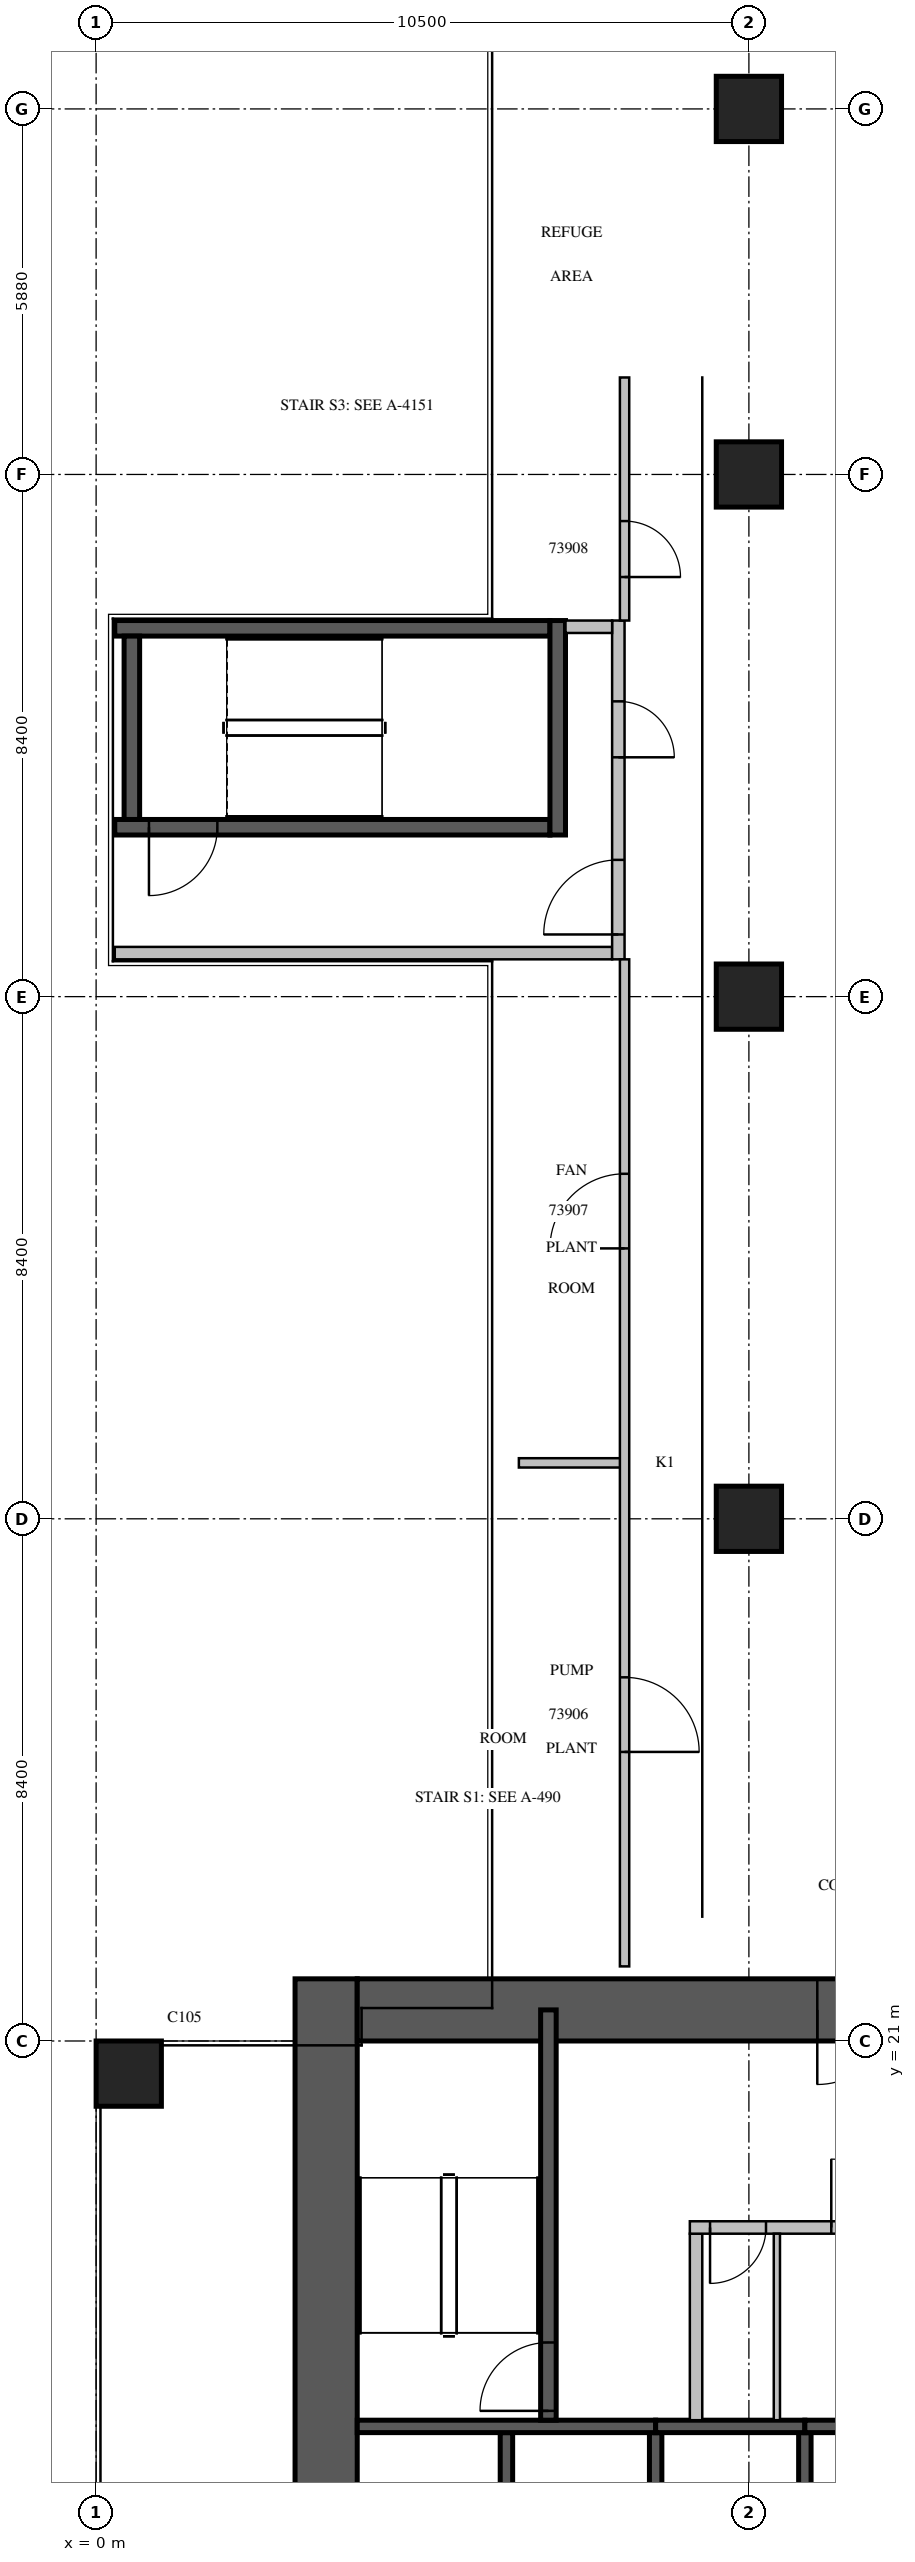
"""IFC4 building model, lengths in metres.
Left out: names, types, materials, properties, quantities, classifications, styles, units other than length and angle.
Written with IfcOpenShell. Run it as: python <this file> out.ifc"""

import sys

from ifc_helpers import new_model, si_unit, direction, frame, frame_2d, origin, origin_2d, place, context, subcontext, project, spatial, rectangle, extrude, source, transform, mapped, element, fill, save


model = new_model("IFC4")
c1 = context("Model", 3, precision=1e-05, world=origin(), true_north=direction((0.0, 1.0)))
c2 = subcontext(c1, "Body", "Model", "MODEL_VIEW")
j1 = project(units=[si_unit("LENGTHUNIT", "METRE"), si_unit("PLANEANGLEUNIT", "RADIAN")], contexts=[c1])
p1 = place(None, origin())
s1 = spatial("IfcSite", under=j1, at=p1, CompositionType="ELEMENT")
p2 = place(p1, origin())
s2 = spatial("IfcBuilding", under=s1, at=p2, CompositionType="ELEMENT")
p3 = place(p2, frame((0.0, 0.0, 162.3)))
s3 = spatial("IfcBuildingStorey", under=s2, at=p3, CompositionType="ELEMENT", Elevation=162.3)
m1 = source(origin(), c2, "Body", "SweptSolid", [
    extrude(rectangle(XDim=1.05, YDim=1.05, at=origin_2d()), origin(), (0.0, 0.0, 1.0), 8.0),
])
for number, where, z_axis, x_axis in (
    (1, (0.525, 20.475, 0.0), (0.0, 0.0, 1.0), (1.0, 0.0, 0.0)),
    (2, (10.5, 29.4, 0.0), (0.0, 0.0, 1.0), (1.0, 0.0, 0.0)),
    (3, (10.5, 37.8, 0.0), (0.0, 0.0, 1.0), (1.0, 0.0, 0.0)),
    (4, (10.5, 46.2, 0.0), (0.0, 0.0, 1.0), (1.0, 0.0, 0.0)),
    (5, (10.5, 52.08, 0.0), (0.0, 0.0, 1.0), (1.0, 0.0, 0.0)),
):
    element("IfcColumn", number, at=place(p3, frame(where, z_axis=z_axis, x_axis=x_axis)), inside=s3, PredefinedType="COLUMN", context=c2, shape_type="MappedRepresentation", body=[
        mapped(m1, transform((0.0, 0.0, 0.0), scale=1.0)),
    ])
p4 = place(p3, frame((3.7, 4.2, 0.0), z_axis=(0.0, 0.0, 1.0), x_axis=(0.0, 1.0, 0.0)))
e6 = element("IfcWall", 6, at=p4, inside=s3, PredefinedType="SHEAR", context=c2, shape_type="SweptSolid", body=[
    extrude(rectangle(XDim=17.8, YDim=1.0, at=frame_2d((8.9, 0.0))), origin(), (0.0, 0.0, 1.0), 8.0),
])
m2 = source(origin(), c2, "Body", "SweptSolid", [
    extrude(rectangle(XDim=2.2, YDim=2.1, at=frame_2d((1.1, 1.05))), frame((0.0, 0.51, 0.0), z_axis=(0.0, -1.0, 0.0), x_axis=(1.0, 0.0, 0.0)), (0.0, 0.0, 1.0), 1.02),
])
p5 = place(p4, frame((4.2, 0.0, 0.0)))
e7 = element("IfcOpeningElement", 7, at=p5, cuts=e6, PredefinedType="OPENING", context=c2, shape_type="MappedRepresentation", body=[
    mapped(m2, transform((0.0, 0.0, 0.0), scale=1.0)),
])
m3 = source(origin(), c2, "Body", "SweptSolid", [
    extrude(rectangle(XDim=16.8, YDim=1.0, at=frame_2d((8.4, 0.0))), origin(), (0.0, 0.0, 1.0), 8.0),
])
p6 = place(p3, frame((4.2, 21.5, 0.0), z_axis=(0.0, 0.0, 1.0), x_axis=(1.0, 0.0, 0.0)))
e8 = element("IfcWall", 8, at=p6, inside=s3, PredefinedType="SHEAR", context=c2, shape_type="MappedRepresentation", body=[
    mapped(m3, transform((0.0, 0.0, 0.0), scale=1.0)),
])
m4 = source(origin(), c2, "Body", "SweptSolid", [
    extrude(rectangle(XDim=1.2, YDim=2.1, at=frame_2d((0.6, 1.05))), frame((0.0, 0.51, 0.0), z_axis=(0.0, -1.0, 0.0), x_axis=(1.0, 0.0, 0.0)), (0.0, 0.0, 1.0), 1.02),
])
p7 = place(p6, frame((7.4, 0.0, 0.0)))
e9 = element("IfcOpeningElement", 9, at=p7, cuts=e8, PredefinedType="OPENING", context=c2, shape_type="MappedRepresentation", body=[
    mapped(m4, transform((0.0, 0.0, 0.0), scale=1.0)),
])
p8 = place(p3, frame((6.6, 11.7, 0.0), z_axis=(0.0, 0.0, 1.0), x_axis=(0.0, 1.0, 0.0)))
e10 = element("IfcWall", 10, at=p8, inside=s3, PredefinedType="SOLIDWALL", context=c2, shape_type="SweptSolid", body=[
    extrude(rectangle(XDim=3.0, YDim=0.2, at=frame_2d((1.5, 0.0))), origin(), (0.0, 0.0, 1.0), 8.0),
])
p9 = place(p3, frame((9.0, 11.7, 0.0), z_axis=(0.0, 0.0, 1.0), x_axis=(0.0, 1.0, 0.0)))
e11 = element("IfcWall", 11, at=p9, inside=s3, PredefinedType="SOLIDWALL", context=c2, shape_type="SweptSolid", body=[
    extrude(rectangle(XDim=3.0, YDim=0.2, at=frame_2d((1.5, 0.0))), origin(), (0.0, 0.0, 1.0), 7.6),
])
m5 = source(origin(), c2, "Body", "SweptSolid", [
    extrude(rectangle(XDim=3.0, YDim=0.2, at=frame_2d((1.5, 0.0))), origin(), (0.0, 0.0, 1.0), 7.6),
])
p10 = place(p3, frame((11.4, 11.7, 0.0), z_axis=(0.0, 0.0, 1.0), x_axis=(0.0, 1.0, 0.0)))
e12 = element("IfcWall", 12, at=p10, inside=s3, PredefinedType="SOLIDWALL", context=c2, shape_type="MappedRepresentation", body=[
    mapped(m5, transform((0.0, 0.0, 0.0), scale=1.0)),
])
m6 = source(origin(), c2, "Body", "SweptSolid", [
    extrude(rectangle(XDim=4.8, YDim=0.2, at=frame_2d((2.4, 0.0))), origin(), (0.0, 0.0, 1.0), 8.0),
])
p11 = place(p3, frame((4.2, 14.8, 0.0), z_axis=(0.0, 0.0, 1.0), x_axis=(1.0, 0.0, 0.0)))
e13 = element("IfcWall", 13, at=p11, inside=s3, PredefinedType="SOLIDWALL", context=c2, shape_type="MappedRepresentation", body=[
    mapped(m6, transform((0.0, 0.0, 0.0), scale=1.0)),
])
m7 = source(origin(), c2, "Body", "SweptSolid", [
    extrude(rectangle(XDim=2.4, YDim=0.2, at=frame_2d((1.2, 0.0))), origin(), (0.0, 0.0, 1.0), 7.6),
])
p12 = place(p3, frame((9.0, 14.8, 0.0), z_axis=(0.0, 0.0, 1.0), x_axis=(1.0, 0.0, 0.0)))
e14 = element("IfcWall", 14, at=p12, inside=s3, PredefinedType="SOLIDWALL", context=c2, shape_type="MappedRepresentation", body=[
    mapped(m7, transform((0.0, 0.0, 0.0), scale=1.0)),
])
m8 = source(origin(), c2, "Body", "SweptSolid", [
    extrude(rectangle(XDim=9.6, YDim=0.2, at=frame_2d((4.8, 0.0))), origin(), (0.0, 0.0, 1.0), 8.0),
])
p13 = place(p3, frame((11.4, 14.8, 0.0), z_axis=(0.0, 0.0, 1.0), x_axis=(1.0, 0.0, 0.0)))
e15 = element("IfcWall", 15, at=p13, inside=s3, PredefinedType="SOLIDWALL", context=c2, shape_type="MappedRepresentation", body=[
    mapped(m8, transform((0.0, 0.0, 0.0), scale=1.0)),
])
m9 = source(origin(), c2, "Body", "SweptSolid", [
    extrude(rectangle(XDim=1.1, YDim=2.1, at=frame_2d((0.55, 1.05))), frame((0.0, 0.11, 0.0), z_axis=(0.0, -1.0, 0.0), x_axis=(1.0, 0.0, 0.0)), (0.0, 0.0, 1.0), 0.22),
])
p14 = place(p13, frame((3.05, 0.0, 0.0)))
e16 = element("IfcOpeningElement", 16, at=p14, cuts=e15, PredefinedType="OPENING", context=c2, shape_type="MappedRepresentation", body=[
    mapped(m9, transform((0.0, 0.0, 0.0), scale=1.0)),
])
p15 = place(p13, frame((5.45, 0.0, 0.0)))
e17 = element("IfcOpeningElement", 17, at=p15, cuts=e15, PredefinedType="OPENING", context=c2, shape_type="MappedRepresentation", body=[
    mapped(m9, transform((0.0, 0.0, 0.0), scale=1.0)),
])
p16 = place(p13, frame((7.85, 0.0, 0.0)))
e18 = element("IfcOpeningElement", 18, at=p16, cuts=e15, PredefinedType="OPENING", context=c2, shape_type="MappedRepresentation", body=[
    mapped(m9, transform((0.0, 0.0, 0.0), scale=1.0)),
])
p17 = place(p3, frame((7.275, 14.9, 0.0), z_axis=(0.0, 0.0, 1.0), x_axis=(0.0, 1.0, 0.0)))
e19 = element("IfcWall", 19, at=p17, inside=s3, PredefinedType="SOLIDWALL", context=c2, shape_type="SweptSolid", body=[
    extrude(rectangle(XDim=6.6, YDim=0.25, at=frame_2d((3.3, 0.0))), origin(), (0.0, 0.0, 1.0), 7.6),
])
m10 = source(origin(), c2, "Body", "SweptSolid", [
    extrude(rectangle(XDim=1.1, YDim=2.1, at=frame_2d((0.55, 1.05))), frame((0.0, 0.135, 0.0), z_axis=(0.0, -1.0, 0.0), x_axis=(1.0, 0.0, 0.0)), (0.0, 0.0, 1.0), 0.27),
])
p18 = place(p17, frame((0.15, 0.0, 0.0)))
e20 = element("IfcOpeningElement", 20, at=p18, cuts=e19, PredefinedType="OPENING", context=c2, shape_type="MappedRepresentation", body=[
    mapped(m10, transform((0.0, 0.0, 0.0), scale=1.0)),
])
p19 = place(p3, frame((9.65, 14.9, 0.0), z_axis=(0.0, 0.0, 1.0), x_axis=(0.0, 1.0, 0.0)))
e21 = element("IfcWall", 21, at=p19, inside=s3, PredefinedType="PARTITIONING", context=c2, shape_type="SweptSolid", body=[
    extrude(rectangle(XDim=3.0, YDim=0.2, at=frame_2d((1.5, 0.0))), origin(), (0.0, 0.0, 1.0), 7.6),
])
p20 = place(p3, frame((9.55, 18.0, 0.0), z_axis=(0.0, 0.0, 1.0), x_axis=(1.0, 0.0, 0.0)))
e22 = element("IfcWall", 22, at=p20, inside=s3, PredefinedType="PARTITIONING", context=c2, shape_type="SweptSolid", body=[
    extrude(rectangle(XDim=11.45, YDim=0.2, at=frame_2d((5.725, 0.0))), origin(), (0.0, 0.0, 1.0), 7.6),
])
m11 = source(origin(), c2, "Body", "SweptSolid", [
    extrude(rectangle(XDim=0.9, YDim=2.1, at=frame_2d((0.45, 1.05))), frame((0.0, 0.11, 0.0), z_axis=(0.0, -1.0, 0.0), x_axis=(1.0, 0.0, 0.0)), (0.0, 0.0, 1.0), 0.22),
])
p21 = place(p20, frame((0.325, 0.0, 0.0)))
e23 = element("IfcOpeningElement", 23, at=p21, cuts=e22, PredefinedType="OPENING", context=c2, shape_type="MappedRepresentation", body=[
    mapped(m11, transform((0.0, 0.0, 0.0), scale=1.0)),
])
p22 = place(p20, frame((2.275, 0.0, 0.0)))
e24 = element("IfcOpeningElement", 24, at=p22, cuts=e22, PredefinedType="OPENING", context=c2, shape_type="MappedRepresentation", body=[
    mapped(m9, transform((0.0, 0.0, 0.0), scale=1.0)),
])
p23 = place(p20, frame((7.35, 0.0, 0.0)))
e25 = element("IfcOpeningElement", 25, at=p23, cuts=e22, PredefinedType="OPENING", context=c2, shape_type="MappedRepresentation", body=[
    mapped(m9, transform((0.0, 0.0, 0.0), scale=1.0)),
])
p24 = place(p3, frame((10.95, 14.9, 0.0), z_axis=(0.0, 0.0, 1.0), x_axis=(0.0, 1.0, 0.0)))
e26 = element("IfcWall", 26, at=p24, inside=s3, PredefinedType="PARTITIONING", context=c2, shape_type="SweptSolid", body=[
    extrude(rectangle(XDim=3.0, YDim=0.1, at=frame_2d((1.5, 0.0))), origin(), (0.0, 0.0, 1.0), 7.6),
])
m12 = source(origin(), c2, "Body", "SweptSolid", [
    extrude(rectangle(XDim=7.0, YDim=0.25, at=frame_2d((3.5, 0.0))), origin(), (0.0, 0.0, 1.0), 7.6),
])
p25 = place(p3, frame((0.3, 40.525, 0.0), z_axis=(0.0, 0.0, 1.0), x_axis=(1.0, 0.0, 0.0)))
e27 = element("IfcWall", 27, at=p25, inside=s3, PredefinedType="SOLIDWALL", context=c2, shape_type="MappedRepresentation", body=[
    mapped(m12, transform((0.0, 0.0, 0.0), scale=1.0)),
])
p26 = place(p25, frame((0.55, 0.0, 0.0)))
e28 = element("IfcOpeningElement", 28, at=p26, cuts=e27, PredefinedType="OPENING", context=c2, shape_type="MappedRepresentation", body=[
    mapped(m10, transform((0.0, 0.0, 0.0), scale=1.0)),
])
p27 = place(p3, frame((0.3, 43.725, 0.0), z_axis=(0.0, 0.0, 1.0), x_axis=(1.0, 0.0, 0.0)))
e29 = element("IfcWall", 29, at=p27, inside=s3, PredefinedType="SOLIDWALL", context=c2, shape_type="MappedRepresentation", body=[
    mapped(m12, transform((0.0, 0.0, 0.0), scale=1.0)),
])
m13 = source(origin(), c2, "Body", "SweptSolid", [
    extrude(rectangle(XDim=3.45, YDim=0.25, at=frame_2d((1.725, 0.0))), origin(), (0.0, 0.0, 1.0), 7.6),
])
p28 = place(p3, frame((7.425, 40.4, 0.0), z_axis=(0.0, 0.0, 1.0), x_axis=(0.0, 1.0, 0.0)))
e30 = element("IfcWall", 30, at=p28, inside=s3, PredefinedType="SOLIDWALL", context=c2, shape_type="MappedRepresentation", body=[
    mapped(m13, transform((0.0, 0.0, 0.0), scale=1.0)),
])
m14 = source(origin(), c2, "Body", "SweptSolid", [
    extrude(rectangle(XDim=2.95, YDim=0.25, at=frame_2d((1.475, 0.0))), origin(), (0.0, 0.0, 1.0), 7.6),
])
p29 = place(p3, frame((0.575, 40.65, 0.0), z_axis=(0.0, 0.0, 1.0), x_axis=(0.0, 1.0, 0.0)))
e31 = element("IfcWall", 31, at=p29, inside=s3, PredefinedType="SOLIDWALL", context=c2, shape_type="MappedRepresentation", body=[
    mapped(m14, transform((0.0, 0.0, 0.0), scale=1.0)),
])
m15 = source(origin(), c2, "Body", "SweptSolid", [
    extrude(rectangle(XDim=8.0, YDim=0.2, at=frame_2d((4.0, 0.0))), origin(), (0.0, 0.0, 1.0), 7.6),
])
p30 = place(p3, frame((0.3, 38.5, 0.0), z_axis=(0.0, 0.0, 1.0), x_axis=(1.0, 0.0, 0.0)))
e32 = element("IfcWall", 32, at=p30, inside=s3, PredefinedType="PARTITIONING", context=c2, shape_type="MappedRepresentation", body=[
    mapped(m15, transform((0.0, 0.0, 0.0), scale=1.0)),
])
m16 = source(origin(), c2, "Body", "SweptSolid", [
    extrude(rectangle(XDim=5.45, YDim=0.2, at=frame_2d((2.725, 0.0))), origin(), (0.0, 0.0, 1.0), 7.6),
])
p31 = place(p3, frame((8.4, 38.4, 0.0), z_axis=(0.0, 0.0, 1.0), x_axis=(0.0, 1.0, 0.0)))
e33 = element("IfcWall", 33, at=p31, inside=s3, PredefinedType="PARTITIONING", context=c2, shape_type="MappedRepresentation", body=[
    mapped(m16, transform((0.0, 0.0, 0.0), scale=1.0)),
])
m17 = source(origin(), c2, "Body", "SweptSolid", [
    extrude(rectangle(XDim=1.2, YDim=2.1, at=frame_2d((0.6, 1.05))), frame((0.0, 0.11, 0.0), z_axis=(0.0, -1.0, 0.0), x_axis=(1.0, 0.0, 0.0)), (0.0, 0.0, 1.0), 0.22),
])
p32 = place(p31, frame((0.4, 0.0, 0.0)))
e34 = element("IfcOpeningElement", 34, at=p32, cuts=e33, PredefinedType="OPENING", context=c2, shape_type="MappedRepresentation", body=[
    mapped(m17, transform((0.0, 0.0, 0.0), scale=1.0)),
])
p33 = place(p31, frame((3.25, 0.0, 0.0)))
e35 = element("IfcOpeningElement", 35, at=p33, cuts=e33, PredefinedType="OPENING", context=c2, shape_type="MappedRepresentation", body=[
    mapped(m11, transform((0.0, 0.0, 0.0), scale=1.0)),
])
m18 = source(origin(), c2, "Body", "SweptSolid", [
    extrude(rectangle(XDim=0.75, YDim=0.2, at=frame_2d((0.375, 0.0))), origin(), (0.0, 0.0, 1.0), 7.6),
])
p34 = place(p3, frame((7.55, 43.75, 0.0), z_axis=(0.0, 0.0, 1.0), x_axis=(1.0, 0.0, 0.0)))
e36 = element("IfcWall", 36, at=p34, inside=s3, PredefinedType="PARTITIONING", context=c2, shape_type="MappedRepresentation", body=[
    mapped(m18, transform((0.0, 0.0, 0.0), scale=1.0)),
])
p35 = place(p3, frame((6.8, 30.3, 0.0), z_axis=(0.0, 0.0, 1.0), x_axis=(1.0, 0.0, 0.0)))
e37 = element("IfcWall", 37, at=p35, inside=s3, PredefinedType="PARTITIONING", context=c2, shape_type="SweptSolid", body=[
    extrude(rectangle(XDim=1.7, YDim=0.15, at=frame_2d((0.85, 0.0))), origin(), (0.0, 0.0, 1.0), 7.6),
])
m19 = source(origin(), c2, "Body", "SweptSolid", [
    extrude(rectangle(XDim=16.2, YDim=0.15, at=frame_2d((8.1, 0.0))), origin(), (0.0, 0.0, 1.0), 7.6),
])
p36 = place(p3, frame((8.5, 22.2, 0.0), z_axis=(0.0, 0.0, 1.0), x_axis=(0.0, 1.0, 0.0)))
e38 = element("IfcWall", 38, at=p36, inside=s3, PredefinedType="PARTITIONING", context=c2, shape_type="MappedRepresentation", body=[
    mapped(m19, transform((0.0, 0.0, 0.0), scale=1.0)),
])
m20 = source(origin(), c2, "Body", "SweptSolid", [
    extrude(rectangle(XDim=1.2, YDim=2.1, at=frame_2d((0.6, 1.05))), frame((0.0, 0.085, 0.0), z_axis=(0.0, -1.0, 0.0), x_axis=(1.0, 0.0, 0.0)), (0.0, 0.0, 1.0), 0.17),
])
p37 = place(p36, frame((3.45, 0.0, 0.0)))
e39 = element("IfcOpeningElement", 39, at=p37, cuts=e38, PredefinedType="OPENING", context=c2, shape_type="MappedRepresentation", body=[
    mapped(m20, transform((0.0, 0.0, 0.0), scale=1.0)),
])
p38 = place(p36, frame((11.55, 0.0, 0.0)))
e40 = element("IfcOpeningElement", 40, at=p38, cuts=e38, PredefinedType="OPENING", context=c2, shape_type="MappedRepresentation", body=[
    mapped(m20, transform((0.0, 0.0, 0.0), scale=1.0)),
])
p39 = place(p3, frame((8.5, 43.85, 0.0), z_axis=(0.0, 0.0, 1.0), x_axis=(0.0, 1.0, 0.0)))
e41 = element("IfcWall", 41, at=p39, inside=s3, PredefinedType="PARTITIONING", context=c2, shape_type="SweptSolid", body=[
    extrude(rectangle(XDim=3.91, YDim=0.15, at=frame_2d((1.955, 0.0))), origin(), (0.0, 0.0, 1.0), 7.6),
])
m21 = source(origin(), c2, "Body", "SweptSolid", [
    extrude(rectangle(XDim=0.9, YDim=2.1, at=frame_2d((0.45, 1.05))), frame((0.0, 0.085, 0.0), z_axis=(0.0, -1.0, 0.0), x_axis=(1.0, 0.0, 0.0)), (0.0, 0.0, 1.0), 0.17),
])
p40 = place(p39, frame((0.7, 0.0, 0.0)))
e42 = element("IfcOpeningElement", 42, at=p40, cuts=e41, PredefinedType="OPENING", context=c2, shape_type="MappedRepresentation", body=[
    mapped(m21, transform((0.0, 0.0, 0.0), scale=1.0)),
])
m22 = source(origin(), c2, "Body", "SweptSolid", [
    extrude(rectangle(XDim=1.1, YDim=2.1, at=frame_2d((0.55, 1.05))), frame((0.0, 0.025, 0.0), z_axis=(0.0, -1.0, 0.0), x_axis=(1.0, 0.0, 0.0)), (0.0, 0.0, 1.0), 0.05),
])
p41 = place(p18, origin())
e43 = element("IfcDoor", 43, at=p41, inside=s3, OperationType="SINGLE_SWING_LEFT", PredefinedType="DOOR", context=c2, shape_type="MappedRepresentation", body=[
    mapped(m22, transform((0.0, 0.0, 0.0), scale=1.0)),
])
fill(e20, e43)
m23 = source(origin(), c2, "Body", "SweptSolid", [
    extrude(rectangle(XDim=0.9, YDim=2.1, at=frame_2d((0.45, 1.05))), frame((0.0, 0.025, 0.0), z_axis=(0.0, -1.0, 0.0), x_axis=(1.0, 0.0, 0.0)), (0.0, 0.0, 1.0), 0.05),
])
p42 = place(p21, origin())
e44 = element("IfcDoor", 44, at=p42, inside=s3, OperationType="SINGLE_SWING_RIGHT", PredefinedType="DOOR", context=c2, shape_type="MappedRepresentation", body=[
    mapped(m23, transform((0.0, 0.0, 0.0), scale=1.0)),
])
fill(e23, e44)
p43 = place(p22, origin())
e45 = element("IfcDoor", 45, at=p43, inside=s3, OperationType="SINGLE_SWING_LEFT", PredefinedType="DOOR", context=c2, shape_type="MappedRepresentation", body=[
    mapped(m22, transform((0.0, 0.0, 0.0), scale=1.0)),
])
fill(e24, e45)
p44 = place(p26, origin())
e46 = element("IfcDoor", 46, at=p44, inside=s3, OperationType="SINGLE_SWING_RIGHT", PredefinedType="DOOR", context=c2, shape_type="MappedRepresentation", body=[
    mapped(m22, transform((0.0, 0.0, 0.0), scale=1.0)),
])
fill(e28, e46)
m24 = source(origin(), c2, "Body", "SweptSolid", [
    extrude(rectangle(XDim=1.2, YDim=2.1, at=frame_2d((0.6, 1.05))), frame((0.0, 0.025, 0.0), z_axis=(0.0, -1.0, 0.0), x_axis=(1.0, 0.0, 0.0)), (0.0, 0.0, 1.0), 0.05),
])
p45 = place(p32, origin())
e47 = element("IfcDoor", 47, at=p45, inside=s3, OperationType="SINGLE_SWING_LEFT", PredefinedType="DOOR", context=c2, shape_type="MappedRepresentation", body=[
    mapped(m24, transform((0.0, 0.0, 0.0), scale=1.0)),
])
fill(e34, e47)
p46 = place(p33, origin())
e48 = element("IfcDoor", 48, at=p46, inside=s3, OperationType="SINGLE_SWING_RIGHT", PredefinedType="DOOR", context=c2, shape_type="MappedRepresentation", body=[
    mapped(m23, transform((0.0, 0.0, 0.0), scale=1.0)),
])
fill(e35, e48)
p47 = place(p7, origin())
e49 = element("IfcDoor", 49, at=p47, inside=s3, OperationType="SINGLE_SWING_RIGHT", PredefinedType="DOOR", context=c2, shape_type="MappedRepresentation", body=[
    mapped(m24, transform((0.0, 0.0, 0.0), scale=1.0)),
])
fill(e9, e49)
p48 = place(p37, origin())
e50 = element("IfcDoor", 50, at=p48, inside=s3, OperationType="SINGLE_SWING_RIGHT", PredefinedType="DOOR", context=c2, shape_type="MappedRepresentation", body=[
    mapped(m24, transform((0.0, 0.0, 0.0), scale=1.0)),
])
fill(e39, e50)
p49 = place(p38, origin())
e51 = element("IfcDoor", 51, at=p49, inside=s3, OperationType="SINGLE_SWING_LEFT", PredefinedType="DOOR", context=c2, shape_type="MappedRepresentation", body=[
    mapped(m24, transform((0.0, 0.0, 0.0), scale=1.0)),
])
fill(e40, e51)
p50 = place(p40, origin())
e52 = element("IfcDoor", 52, at=p50, inside=s3, OperationType="SINGLE_SWING_RIGHT", PredefinedType="DOOR", context=c2, shape_type="MappedRepresentation", body=[
    mapped(m23, transform((0.0, 0.0, 0.0), scale=1.0)),
])
fill(e42, e52)
save(model, sys.argv[1])
